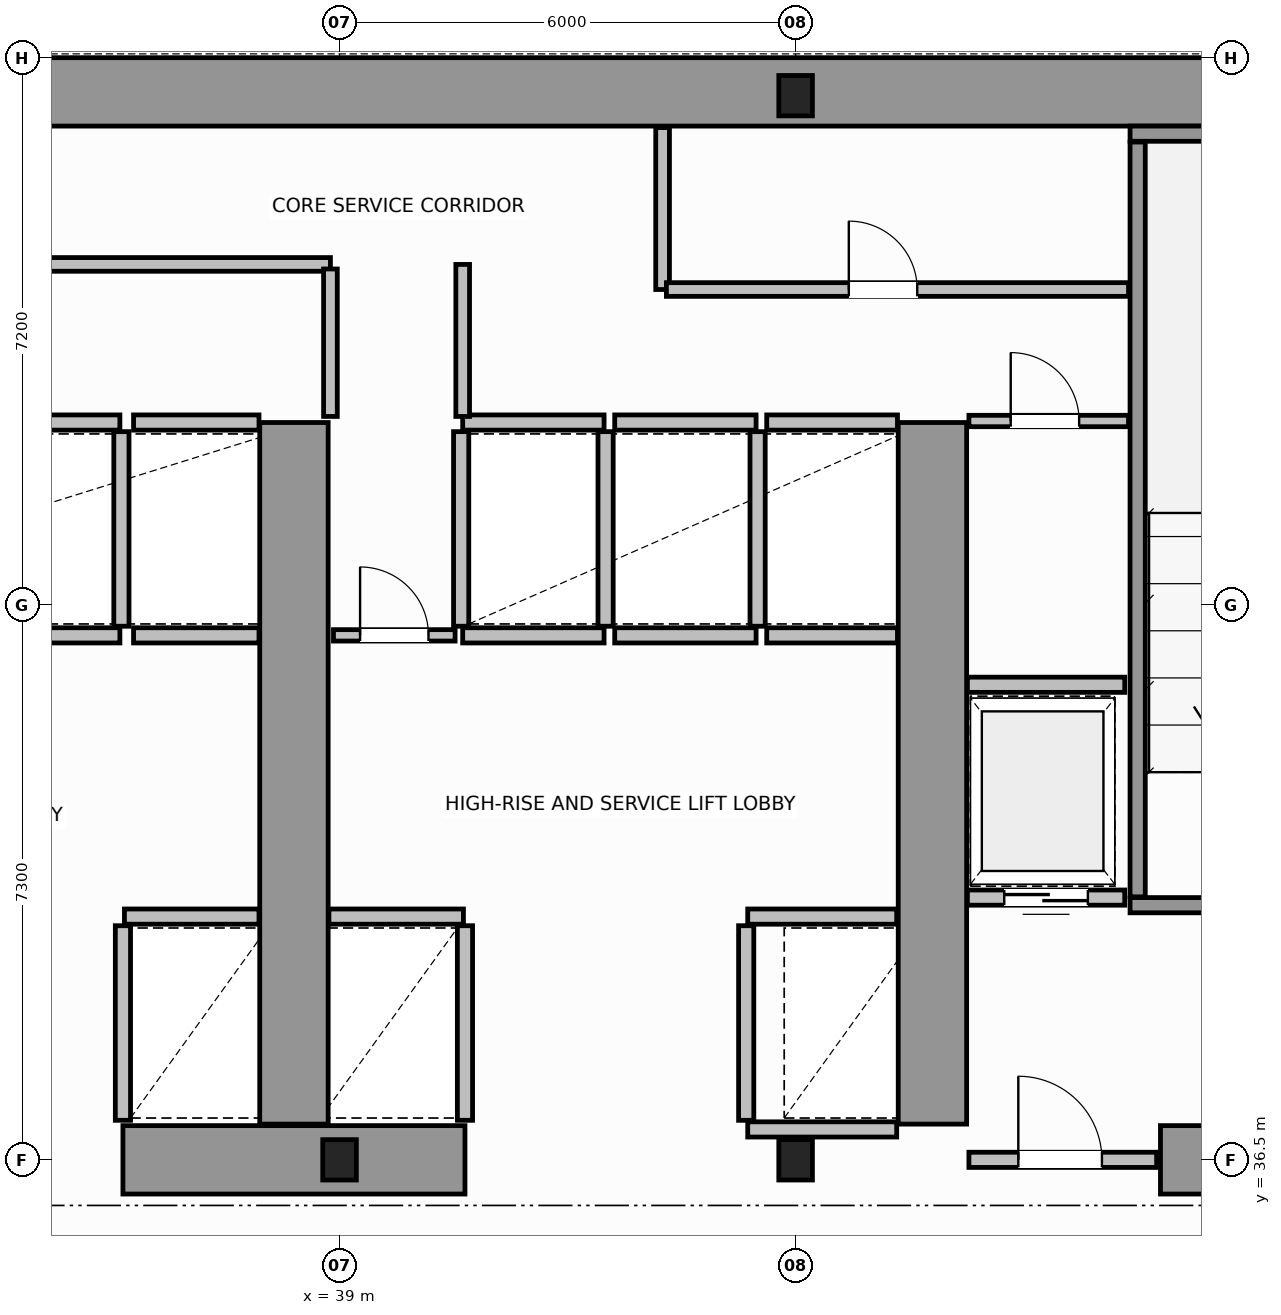
"""IFC4 building model, lengths in metres.
Left out: names, types, materials, properties, quantities, classifications, styles, units other than length and angle.
Written with IfcOpenShell. Run it as: python <this file> out.ifc"""

import sys

from ifc_helpers import new_model, si_unit, direction, frame, frame_2d, origin, origin_2d, place, context, subcontext, project, spatial, rectangle, i_section, extrude, source, transform, mapped, element, fill, save


model = new_model("IFC4")
c1 = context("Model", 3, precision=1e-05, world=origin(), true_north=direction((0.0, 1.0)))
c2 = subcontext(c1, "Body", "Model", "MODEL_VIEW")
j1 = project(units=[si_unit("LENGTHUNIT", "METRE"), si_unit("PLANEANGLEUNIT", "RADIAN")], contexts=[c1])
p1 = place(None, origin())
s1 = spatial("IfcSite", under=j1, at=p1, CompositionType="ELEMENT")
p2 = place(p1, origin())
s2 = spatial("IfcBuilding", under=s1, at=p2, CompositionType="ELEMENT")
p3 = place(p2, frame((0.0, 0.0, 75.8)))
s3 = spatial("IfcBuildingStorey", under=s2, at=p3, CompositionType="ELEMENT", Elevation=75.8)
m1 = source(origin(), c2, "Body", "SweptSolid", [
    extrude(i_section(OverallWidth=0.442, OverallDepth=0.531, WebThickness=0.065, FlangeThickness=0.076, FilletRadius=0.015, at=origin_2d()), origin(), (0.0, 0.0, 1.0), 3.8),
])
for number, where, z_axis, x_axis in (
    (1, (39.0, 36.5, 0.0), (0.0, 0.0, 1.0), (1.0, 0.0, 0.0)),
    (2, (45.0, 36.5, 0.0), (0.0, 0.0, 1.0), (1.0, 0.0, 0.0)),
    (3, (45.0, 50.5, 0.0), (0.0, 0.0, 1.0), (1.0, 0.0, 0.0)),
):
    element("IfcColumn", number, at=place(p3, frame(where, z_axis=z_axis, x_axis=x_axis)), inside=s3, PredefinedType="COLUMN", context=c2, shape_type="MappedRepresentation", body=[
        mapped(m1, transform((0.0, 0.0, 0.0), scale=1.0)),
    ])
p4 = place(p3, frame((34.002, 50.55, 0.0), z_axis=(0.0, 0.0, 1.0), x_axis=(1.0, 0.0, 0.0)))
e4 = element("IfcWall", 4, at=p4, inside=s3, PredefinedType="SHEAR", context=c2, shape_type="SweptSolid", body=[
    extrude(rectangle(XDim=19.544, YDim=0.9, at=frame_2d((9.772, 0.0))), origin(), (0.0, 0.0, 1.0), 3.8),
])
p5 = place(p3, frame((36.15, 36.5, 0.0), z_axis=(0.0, 0.0, 1.0), x_axis=(1.0, 0.0, 0.0)))
e5 = element("IfcWall", 5, at=p5, inside=s3, PredefinedType="SHEAR", context=c2, shape_type="SweptSolid", body=[
    extrude(rectangle(XDim=4.5, YDim=0.9, at=frame_2d((2.25, 0.0))), origin(), (0.0, 0.0, 1.0), 3.8),
])
p6 = place(p3, frame((49.8, 36.5, 0.0), z_axis=(0.0, 0.0, 1.0), x_axis=(1.0, 0.0, 0.0)))
e6 = element("IfcWall", 6, at=p6, inside=s3, PredefinedType="SHEAR", context=c2, shape_type="SweptSolid", body=[
    extrude(rectangle(XDim=3.73, YDim=0.9, at=frame_2d((1.865, 0.0))), origin(), (0.0, 0.0, 1.0), 2.38),
])
for number, where, z_axis, x_axis in (
    (7, (38.4, 36.97, 0.0), (0.0, 0.0, 1.0), (0.0, 1.0, 0.0)),
    (8, (46.8, 36.97, 0.0), (0.0, 0.0, 1.0), (0.0, 1.0, 0.0)),
):
    element("IfcWall", number, at=place(p3, frame(where, z_axis=z_axis, x_axis=x_axis)), inside=s3, PredefinedType="SHEAR", context=c2, shape_type="SweptSolid", body=[
        extrude(rectangle(XDim=9.23, YDim=0.9, at=frame_2d((4.615, 0.0))), origin(), (0.0, 0.0, 1.0), 3.8),
    ])
p7 = place(p3, frame((49.4, 39.85, 0.0), z_axis=(0.0, 0.0, 1.0), x_axis=(1.0, 0.0, 0.0)))
e9 = element("IfcWall", 9, at=p7, inside=s3, PredefinedType="SOLIDWALL", context=c2, shape_type="SweptSolid", body=[
    extrude(rectangle(XDim=4.15, YDim=0.2, at=frame_2d((2.075, 0.0))), origin(), (0.0, 0.0, 1.0), 3.8),
])
p8 = place(p7, frame((1.325, 0.0, 0.0)))
e10 = element("IfcOpeningElement", 10, at=p8, cuts=e9, PredefinedType="OPENING", context=c2, shape_type="SweptSolid", body=[
    extrude(rectangle(XDim=1.1, YDim=2.15, at=frame_2d((0.55, 1.075))), frame((0.0, 0.11, 0.0), z_axis=(0.0, -1.0, 0.0), x_axis=(1.0, 0.0, 0.0)), (0.0, 0.0, 1.0), 0.22),
])
p9 = place(p3, frame((49.4, 50.0, 0.0), z_axis=(0.0, 0.0, 1.0), x_axis=(1.0, 0.0, 0.0)))
e11 = element("IfcWall", 11, at=p9, inside=s3, PredefinedType="SOLIDWALL", context=c2, shape_type="SweptSolid", body=[
    extrude(rectangle(XDim=4.15, YDim=0.2, at=frame_2d((2.075, 0.0))), origin(), (0.0, 0.0, 1.0), 3.8),
])
p10 = place(p3, frame((49.5, 39.96, 0.0), z_axis=(0.0, 0.0, 1.0), x_axis=(0.0, 1.0, 0.0)))
e12 = element("IfcWall", 12, at=p10, inside=s3, PredefinedType="SOLIDWALL", context=c2, shape_type="SweptSolid", body=[
    extrude(rectangle(XDim=9.93, YDim=0.2, at=frame_2d((4.965, 0.0))), origin(), (0.0, 0.0, 1.0), 3.8),
])
p11 = place(p3, frame((47.28, 36.5, 0.0), z_axis=(0.0, 0.0, 1.0), x_axis=(1.0, 0.0, 0.0)))
e13 = element("IfcWall", 13, at=p11, inside=s3, PredefinedType="SOLIDWALL", context=c2, shape_type="SweptSolid", body=[
    extrude(rectangle(XDim=2.47, YDim=0.2, at=frame_2d((1.235, 0.0))), origin(), (0.0, 0.0, 1.0), 2.37),
])
p12 = place(p11, frame((0.65, 0.0, 0.0)))
e14 = element("IfcOpeningElement", 14, at=p12, cuts=e13, PredefinedType="OPENING", context=c2, shape_type="SweptSolid", body=[
    extrude(rectangle(XDim=1.1, YDim=2.15, at=frame_2d((0.55, 1.075))), frame((0.0, 0.11, 0.0), z_axis=(0.0, -1.0, 0.0), x_axis=(1.0, 0.0, 0.0)), (0.0, 0.0, 1.0), 0.22),
])
p13 = place(p3, frame((36.17, 39.7, 0.0), z_axis=(0.0, 0.0, 1.0), x_axis=(1.0, 0.0, 0.0)))
e15 = element("IfcWall", 15, at=p13, inside=s3, PredefinedType="SOLIDWALL", context=c2, shape_type="SweptSolid", body=[
    extrude(rectangle(XDim=1.77, YDim=0.2, at=frame_2d((0.885, 0.0))), origin(), (0.0, 0.0, 1.0), 3.58),
])
p14 = place(p3, frame((36.15, 37.02, 0.0), z_axis=(0.0, 0.0, 1.0), x_axis=(0.0, 1.0, 0.0)))
e16 = element("IfcWall", 16, at=p14, inside=s3, PredefinedType="SOLIDWALL", context=c2, shape_type="SweptSolid", body=[
    extrude(rectangle(XDim=2.56, YDim=0.2, at=frame_2d((1.28, 0.0))), origin(), (0.0, 0.0, 1.0), 3.58),
])
for number, where, z_axis, x_axis in (
    (17, (34.19, 43.4, 0.0), (0.0, 0.0, 1.0), (1.0, 0.0, 0.0)),
    (18, (34.19, 46.2, 0.0), (0.0, 0.0, 1.0), (1.0, 0.0, 0.0)),
):
    element("IfcWall", number, at=place(p3, frame(where, z_axis=z_axis, x_axis=x_axis)), inside=s3, PredefinedType="SOLIDWALL", context=c2, shape_type="SweptSolid", body=[
        extrude(rectangle(XDim=1.92, YDim=0.2, at=frame_2d((0.96, 0.0))), origin(), (0.0, 0.0, 1.0), 3.58),
    ])
p15 = place(p3, frame((36.13, 43.52, 0.0), z_axis=(0.0, 0.0, 1.0), x_axis=(0.0, 1.0, 0.0)))
e19 = element("IfcWall", 19, at=p15, inside=s3, PredefinedType="SOLIDWALL", context=c2, shape_type="SweptSolid", body=[
    extrude(rectangle(XDim=2.56, YDim=0.2, at=frame_2d((1.28, 0.0))), origin(), (0.0, 0.0, 1.0), 3.58),
])
for number, where, z_axis, x_axis in (
    (20, (36.29, 43.4, 0.0), (0.0, 0.0, 1.0), (1.0, 0.0, 0.0)),
    (21, (36.29, 46.2, 0.0), (0.0, 0.0, 1.0), (1.0, 0.0, 0.0)),
):
    element("IfcWall", number, at=place(p3, frame(where, z_axis=z_axis, x_axis=x_axis)), inside=s3, PredefinedType="SOLIDWALL", context=c2, shape_type="SweptSolid", body=[
        extrude(rectangle(XDim=1.65, YDim=0.2, at=frame_2d((0.825, 0.0))), origin(), (0.0, 0.0, 1.0), 3.58),
    ])
p16 = place(p3, frame((38.86, 39.7, 0.0), z_axis=(0.0, 0.0, 1.0), x_axis=(1.0, 0.0, 0.0)))
e22 = element("IfcWall", 22, at=p16, inside=s3, PredefinedType="SOLIDWALL", context=c2, shape_type="SweptSolid", body=[
    extrude(rectangle(XDim=1.77, YDim=0.2, at=frame_2d((0.885, 0.0))), origin(), (0.0, 0.0, 1.0), 3.58),
])
p17 = place(p3, frame((40.65, 37.02, 0.0), z_axis=(0.0, 0.0, 1.0), x_axis=(0.0, 1.0, 0.0)))
e23 = element("IfcWall", 23, at=p17, inside=s3, PredefinedType="SOLIDWALL", context=c2, shape_type="SweptSolid", body=[
    extrude(rectangle(XDim=2.56, YDim=0.2, at=frame_2d((1.28, 0.0))), origin(), (0.0, 0.0, 1.0), 3.58),
])
p18 = place(p3, frame((44.37, 39.7, 0.0), z_axis=(0.0, 0.0, 1.0), x_axis=(1.0, 0.0, 0.0)))
e24 = element("IfcWall", 24, at=p18, inside=s3, PredefinedType="SOLIDWALL", context=c2, shape_type="SweptSolid", body=[
    extrude(rectangle(XDim=1.96, YDim=0.2, at=frame_2d((0.98, 0.0))), origin(), (0.0, 0.0, 1.0), 3.58),
])
p19 = place(p3, frame((44.37, 36.9, 0.0), z_axis=(0.0, 0.0, 1.0), x_axis=(1.0, 0.0, 0.0)))
e25 = element("IfcWall", 25, at=p19, inside=s3, PredefinedType="SOLIDWALL", context=c2, shape_type="SweptSolid", body=[
    extrude(rectangle(XDim=1.96, YDim=0.2, at=frame_2d((0.98, 0.0))), origin(), (0.0, 0.0, 1.0), 2.37),
])
p20 = place(p3, frame((44.35, 37.02, 0.0), z_axis=(0.0, 0.0, 1.0), x_axis=(0.0, 1.0, 0.0)))
e26 = element("IfcWall", 26, at=p20, inside=s3, PredefinedType="SOLIDWALL", context=c2, shape_type="SweptSolid", body=[
    extrude(rectangle(XDim=2.56, YDim=0.2, at=frame_2d((1.28, 0.0))), origin(), (0.0, 0.0, 1.0), 3.58),
])
for number, where, z_axis, x_axis in (
    (27, (40.62, 43.4, 0.0), (0.0, 0.0, 1.0), (1.0, 0.0, 0.0)),
    (28, (40.62, 46.2, 0.0), (0.0, 0.0, 1.0), (1.0, 0.0, 0.0)),
):
    element("IfcWall", number, at=place(p3, frame(where, z_axis=z_axis, x_axis=x_axis)), inside=s3, PredefinedType="SOLIDWALL", context=c2, shape_type="SweptSolid", body=[
        extrude(rectangle(XDim=1.86, YDim=0.2, at=frame_2d((0.93, 0.0))), origin(), (0.0, 0.0, 1.0), 3.58),
    ])
for number, where, z_axis, x_axis in (
    (29, (40.6, 43.52, 0.0), (0.0, 0.0, 1.0), (0.0, 1.0, 0.0)),
    (30, (42.5, 43.52, 0.0), (0.0, 0.0, 1.0), (0.0, 1.0, 0.0)),
):
    element("IfcWall", number, at=place(p3, frame(where, z_axis=z_axis, x_axis=x_axis)), inside=s3, PredefinedType="SOLIDWALL", context=c2, shape_type="SweptSolid", body=[
        extrude(rectangle(XDim=2.56, YDim=0.2, at=frame_2d((1.28, 0.0))), origin(), (0.0, 0.0, 1.0), 3.58),
    ])
for number, where, z_axis, x_axis in (
    (31, (42.62, 43.4, 0.0), (0.0, 0.0, 1.0), (1.0, 0.0, 0.0)),
    (32, (42.62, 46.2, 0.0), (0.0, 0.0, 1.0), (1.0, 0.0, 0.0)),
):
    element("IfcWall", number, at=place(p3, frame(where, z_axis=z_axis, x_axis=x_axis)), inside=s3, PredefinedType="SOLIDWALL", context=c2, shape_type="SweptSolid", body=[
        extrude(rectangle(XDim=1.86, YDim=0.2, at=frame_2d((0.93, 0.0))), origin(), (0.0, 0.0, 1.0), 3.58),
    ])
p21 = place(p3, frame((44.5, 43.52, 0.0), z_axis=(0.0, 0.0, 1.0), x_axis=(0.0, 1.0, 0.0)))
e33 = element("IfcWall", 33, at=p21, inside=s3, PredefinedType="SOLIDWALL", context=c2, shape_type="SweptSolid", body=[
    extrude(rectangle(XDim=2.56, YDim=0.2, at=frame_2d((1.28, 0.0))), origin(), (0.0, 0.0, 1.0), 3.58),
])
for number, where, z_axis, x_axis in (
    (34, (44.62, 43.4, 0.0), (0.0, 0.0, 1.0), (1.0, 0.0, 0.0)),
    (35, (44.62, 46.2, 0.0), (0.0, 0.0, 1.0), (1.0, 0.0, 0.0)),
):
    element("IfcWall", number, at=place(p3, frame(where, z_axis=z_axis, x_axis=x_axis)), inside=s3, PredefinedType="SOLIDWALL", context=c2, shape_type="SweptSolid", body=[
        extrude(rectangle(XDim=1.72, YDim=0.2, at=frame_2d((0.86, 0.0))), origin(), (0.0, 0.0, 1.0), 3.58),
    ])
p22 = place(p3, frame((47.26, 39.95, 0.0), z_axis=(0.0, 0.0, 1.0), x_axis=(1.0, 0.0, 0.0)))
e36 = element("IfcWall", 36, at=p22, inside=s3, PredefinedType="SOLIDWALL", context=c2, shape_type="SweptSolid", body=[
    extrude(rectangle(XDim=2.07, YDim=0.2, at=frame_2d((1.035, 0.0))), origin(), (0.0, 0.0, 1.0), 3.58),
])
p23 = place(p22, frame((0.485, 0.0, 0.0)))
e37 = element("IfcOpeningElement", 37, at=p23, cuts=e36, PredefinedType="OPENING", context=c2, shape_type="SweptSolid", body=[
    extrude(rectangle(XDim=1.1, YDim=2.15, at=frame_2d((0.55, 1.075))), frame((0.0, 0.11, 0.0), z_axis=(0.0, -1.0, 0.0), x_axis=(1.0, 0.0, 0.0)), (0.0, 0.0, 1.0), 0.22),
])
p24 = place(p3, frame((47.26, 42.75, 0.0), z_axis=(0.0, 0.0, 1.0), x_axis=(1.0, 0.0, 0.0)))
e38 = element("IfcWall", 38, at=p24, inside=s3, PredefinedType="SOLIDWALL", context=c2, shape_type="SweptSolid", body=[
    extrude(rectangle(XDim=2.07, YDim=0.2, at=frame_2d((1.035, 0.0))), origin(), (0.0, 0.0, 1.0), 3.58),
])
p25 = place(p3, frame((47.28, 46.22, 0.0), z_axis=(0.0, 0.0, 1.0), x_axis=(1.0, 0.0, 0.0)))
e39 = element("IfcWall", 39, at=p25, inside=s3, PredefinedType="PARTITIONING", context=c2, shape_type="SweptSolid", body=[
    extrude(rectangle(XDim=2.1, YDim=0.15, at=frame_2d((1.05, 0.0))), origin(), (0.0, 0.0, 1.0), 3.58),
])
p26 = place(p25, frame((0.55, 0.0, 0.0)))
e40 = element("IfcOpeningElement", 40, at=p26, cuts=e39, PredefinedType="OPENING", context=c2, shape_type="SweptSolid", body=[
    extrude(rectangle(XDim=0.9, YDim=2.1, at=frame_2d((0.45, 1.05))), frame((0.0, 0.085, 0.0), z_axis=(0.0, -1.0, 0.0), x_axis=(1.0, 0.0, 0.0)), (0.0, 0.0, 1.0), 0.17),
])
p27 = place(p3, frame((38.92, 43.4, 0.0), z_axis=(0.0, 0.0, 1.0), x_axis=(1.0, 0.0, 0.0)))
e41 = element("IfcWall", 41, at=p27, inside=s3, PredefinedType="PARTITIONING", context=c2, shape_type="SweptSolid", body=[
    extrude(rectangle(XDim=1.6, YDim=0.15, at=frame_2d((0.8, 0.0))), origin(), (0.0, 0.0, 1.0), 3.58),
])
p28 = place(p27, frame((0.35, 0.0, 0.0)))
e42 = element("IfcOpeningElement", 42, at=p28, cuts=e41, PredefinedType="OPENING", context=c2, shape_type="SweptSolid", body=[
    extrude(rectangle(XDim=0.9, YDim=2.1, at=frame_2d((0.45, 1.05))), frame((0.0, 0.085, 0.0), z_axis=(0.0, -1.0, 0.0), x_axis=(1.0, 0.0, 0.0)), (0.0, 0.0, 1.0), 0.17),
])
p29 = place(p3, frame((23.85, 48.28, 0.0), z_axis=(0.0, 0.0, 1.0), x_axis=(1.0, 0.0, 0.0)))
e43 = element("IfcWall", 43, at=p29, inside=s3, PredefinedType="PLUMBINGWALL", context=c2, shape_type="SweptSolid", body=[
    extrude(rectangle(XDim=15.03, YDim=0.18, at=frame_2d((7.515, 0.0))), origin(), (0.0, 0.0, 1.0), 3.58),
])
p30 = place(p29, frame((2.9, 0.0, 0.0)))
e44 = element("IfcOpeningElement", 44, at=p30, cuts=e43, PredefinedType="OPENING", context=c2, shape_type="SweptSolid", body=[
    extrude(rectangle(XDim=0.9, YDim=2.15, at=frame_2d((0.45, 1.075))), frame((0.0, 0.1, 0.0), z_axis=(0.0, -1.0, 0.0), x_axis=(1.0, 0.0, 0.0)), (0.0, 0.0, 1.0), 0.2),
])
p31 = place(p29, frame((10.4, 0.0, 0.0)))
e45 = element("IfcOpeningElement", 45, at=p31, cuts=e43, PredefinedType="OPENING", context=c2, shape_type="SweptSolid", body=[
    extrude(rectangle(XDim=0.9, YDim=2.15, at=frame_2d((0.45, 1.075))), frame((0.0, 0.1, 0.0), z_axis=(0.0, -1.0, 0.0), x_axis=(1.0, 0.0, 0.0)), (0.0, 0.0, 1.0), 0.2),
])
p32 = place(p3, frame((38.88, 46.28, 0.0), z_axis=(0.0, 0.0, 1.0), x_axis=(0.0, 1.0, 0.0)))
e46 = element("IfcWall", 46, at=p32, inside=s3, PredefinedType="PLUMBINGWALL", context=c2, shape_type="SweptSolid", body=[
    extrude(rectangle(XDim=1.94, YDim=0.18, at=frame_2d((0.97, 0.0))), origin(), (0.0, 0.0, 1.0), 3.58),
])
p33 = place(p3, frame((40.62, 46.28, 0.0), z_axis=(0.0, 0.0, 1.0), x_axis=(0.0, 1.0, 0.0)))
e47 = element("IfcWall", 47, at=p33, inside=s3, PredefinedType="PLUMBINGWALL", context=c2, shape_type="SweptSolid", body=[
    extrude(rectangle(XDim=2.0, YDim=0.18, at=frame_2d((1.0, 0.0))), origin(), (0.0, 0.0, 1.0), 3.58),
])
p34 = place(p3, frame((43.25, 47.95, 0.0), z_axis=(0.0, 0.0, 1.0), x_axis=(0.0, 1.0, 0.0)))
e48 = element("IfcWall", 48, at=p34, inside=s3, PredefinedType="PLUMBINGWALL", context=c2, shape_type="SweptSolid", body=[
    extrude(rectangle(XDim=2.13, YDim=0.18, at=frame_2d((1.065, 0.0))), origin(), (0.0, 0.0, 1.0), 3.58),
])
p35 = place(p3, frame((43.3, 47.95, 0.0), z_axis=(0.0, 0.0, 1.0), x_axis=(1.0, 0.0, 0.0)))
e49 = element("IfcWall", 49, at=p35, inside=s3, PredefinedType="PLUMBINGWALL", context=c2, shape_type="SweptSolid", body=[
    extrude(rectangle(XDim=6.08, YDim=0.18, at=frame_2d((3.04, 0.0))), origin(), (0.0, 0.0, 1.0), 3.58),
])
p36 = place(p35, frame((2.4, 0.0, 0.0)))
e50 = element("IfcOpeningElement", 50, at=p36, cuts=e49, PredefinedType="OPENING", context=c2, shape_type="SweptSolid", body=[
    extrude(rectangle(XDim=0.9, YDim=2.15, at=frame_2d((0.45, 1.075))), frame((0.0, 0.1, 0.0), z_axis=(0.0, -1.0, 0.0), x_axis=(1.0, 0.0, 0.0)), (0.0, 0.0, 1.0), 0.2),
])
m2 = source(origin(), c2, "Body", "SweptSolid", [
    extrude(rectangle(XDim=1.1, YDim=2.15, at=frame_2d((0.55, 1.075))), frame((0.0, 0.025, 0.0), z_axis=(0.0, -1.0, 0.0), x_axis=(1.0, 0.0, 0.0)), (0.0, 0.0, 1.0), 0.05),
])
p37 = place(p12, origin())
e51 = element("IfcDoor", 51, at=p37, inside=s3, OperationType="SINGLE_SWING_LEFT", PredefinedType="DOOR", context=c2, shape_type="MappedRepresentation", body=[
    mapped(m2, transform((0.0, 0.0, 0.0), scale=1.0)),
])
fill(e14, e51)
p38 = place(p23, origin())
e52 = element("IfcDoor", 52, at=p38, inside=s3, OperationType="DOUBLE_DOOR_SLIDING", PredefinedType="DOOR", context=c2, shape_type="MappedRepresentation", body=[
    mapped(m2, transform((0.0, 0.0, 0.0), scale=1.0)),
])
fill(e37, e52)
m3 = source(origin(), c2, "Body", "SweptSolid", [
    extrude(rectangle(XDim=0.9, YDim=2.1, at=frame_2d((0.45, 1.05))), frame((0.0, 0.025, 0.0), z_axis=(0.0, -1.0, 0.0), x_axis=(1.0, 0.0, 0.0)), (0.0, 0.0, 1.0), 0.05),
])
p39 = place(p26, origin())
e53 = element("IfcDoor", 53, at=p39, inside=s3, OperationType="SINGLE_SWING_RIGHT", PredefinedType="DOOR", context=c2, shape_type="MappedRepresentation", body=[
    mapped(m3, transform((0.0, 0.0, 0.0), scale=1.0)),
])
fill(e40, e53)
p40 = place(p28, origin())
e54 = element("IfcDoor", 54, at=p40, inside=s3, OperationType="SINGLE_SWING_LEFT", PredefinedType="DOOR", context=c2, shape_type="MappedRepresentation", body=[
    mapped(m3, transform((0.0, 0.0, 0.0), scale=1.0)),
])
fill(e42, e54)
m4 = source(origin(), c2, "Body", "SweptSolid", [
    extrude(rectangle(XDim=0.9, YDim=2.15, at=frame_2d((0.45, 1.075))), frame((0.0, 0.025, 0.0), z_axis=(0.0, -1.0, 0.0), x_axis=(1.0, 0.0, 0.0)), (0.0, 0.0, 1.0), 0.05),
])
p41 = place(p36, origin())
e55 = element("IfcDoor", 55, at=p41, inside=s3, OperationType="SINGLE_SWING_RIGHT", PredefinedType="DOOR", context=c2, shape_type="MappedRepresentation", body=[
    mapped(m4, transform((0.0, 0.0, 0.0), scale=1.0)),
])
fill(e50, e55)
save(model, sys.argv[1])
